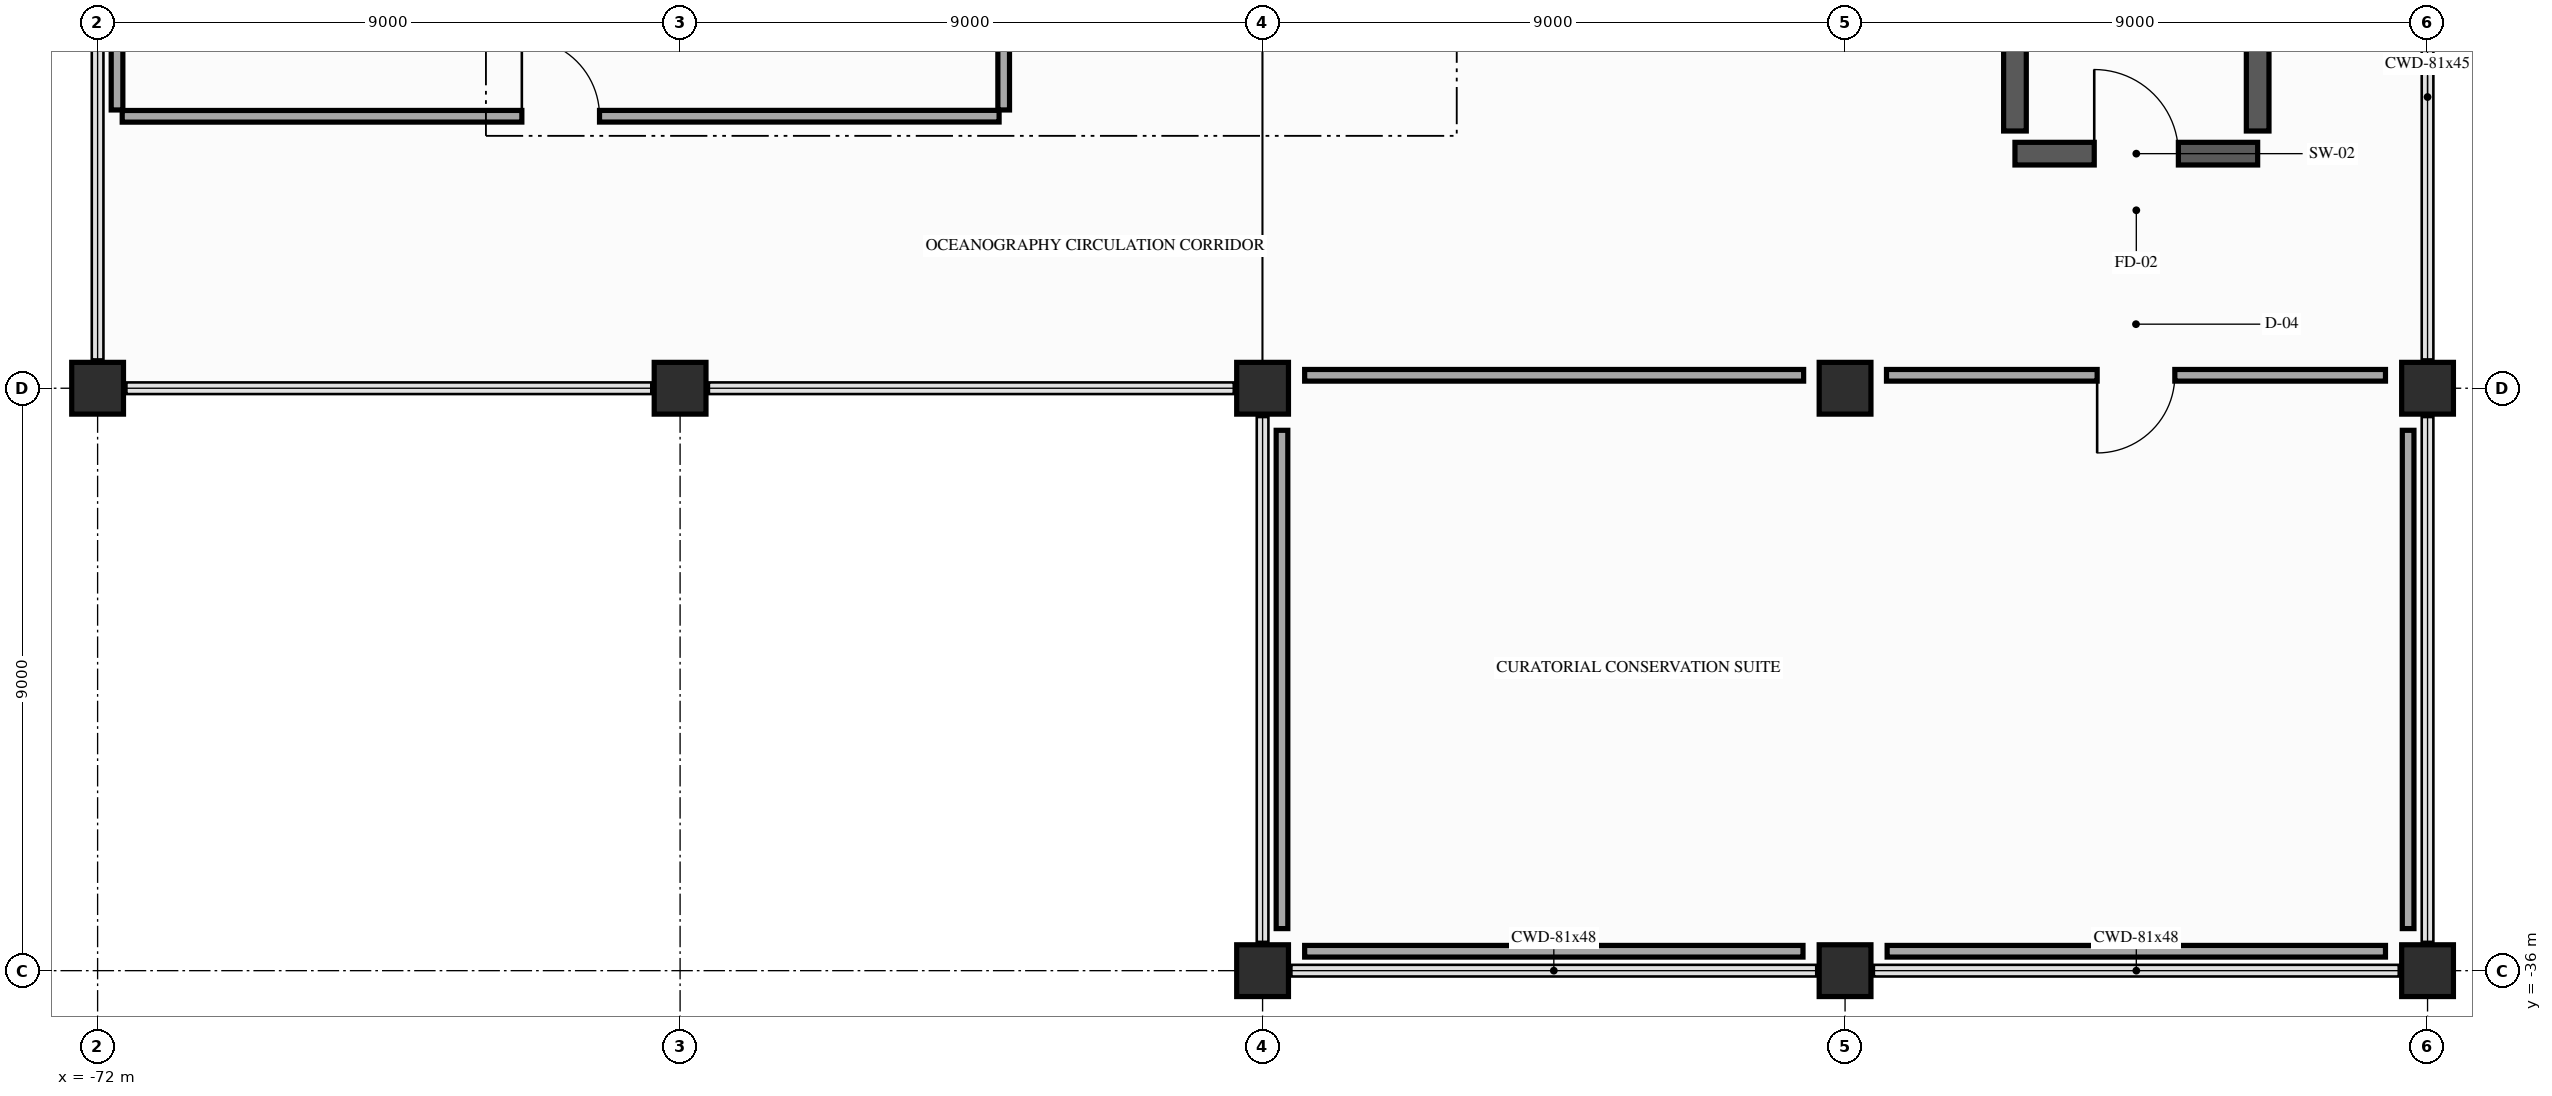
"""IFC4 building model, lengths in metres.
Left out: names, types, materials, properties, quantities, classifications, styles, units other than length and angle.
Written with IfcOpenShell. Run it as: python <this file> out.ifc"""

import sys

from ifc_helpers import new_model, si_unit, direction, frame, frame_2d, origin, origin_2d, place, context, subcontext, project, spatial, rectangle, extrude, element, fill, save


model = new_model("IFC4")
c1 = context("Model", 3, precision=1e-05, world=origin(), true_north=direction((0.0, 1.0)))
c2 = subcontext(c1, "Body", "Model", "MODEL_VIEW")
j1 = project(units=[si_unit("LENGTHUNIT", "METRE"), si_unit("PLANEANGLEUNIT", "RADIAN")], contexts=[c1])
p1 = place(None, origin())
s1 = spatial("IfcSite", under=j1, at=p1, CompositionType="ELEMENT")
p2 = place(p1, origin())
s2 = spatial("IfcBuilding", under=s1, at=p2, CompositionType="ELEMENT")
p3 = place(p2, frame((0.0, 0.0, 16.2)))
s3 = spatial("IfcBuildingStorey", under=s2, at=p3, CompositionType="ELEMENT", Elevation=16.2)
for number, where, z_axis, x_axis in (
    (1, (-72.0, -27.0, 0.0), (0.0, 0.0, 1.0), (1.0, 0.0, 0.0)),
    (2, (-63.0, -27.0, 0.0), (0.0, 0.0, 1.0), (1.0, 0.0, 0.0)),
    (3, (-54.0, -36.0, 0.0), (0.0, 0.0, 1.0), (1.0, 0.0, 0.0)),
    (4, (-54.0, -27.0, 0.0), (0.0, 0.0, 1.0), (1.0, 0.0, 0.0)),
    (5, (-45.0, -36.0, 0.0), (0.0, 0.0, 1.0), (1.0, 0.0, 0.0)),
    (6, (-45.0, -27.0, 0.0), (0.0, 0.0, 1.0), (1.0, 0.0, 0.0)),
    (7, (-36.0, -36.0, 0.0), (0.0, 0.0, 1.0), (1.0, 0.0, 0.0)),
    (8, (-36.0, -27.0, 0.0), (0.0, 0.0, 1.0), (1.0, 0.0, 0.0)),
):
    element("IfcColumn", number, at=place(p3, frame(where, z_axis=z_axis, x_axis=x_axis)), inside=s3, PredefinedType="COLUMN", context=c2, shape_type="SweptSolid", body=[
        extrude(rectangle(XDim=0.8, YDim=0.8, at=origin_2d()), origin(), (0.0, 0.0, 1.0), 5.4),
    ])
p4 = place(p3, frame((-42.375, -23.375, 0.0), z_axis=(0.0, 0.0, 1.0), x_axis=(1.0, 0.0, 0.0)))
e9 = element("IfcWall", 9, at=p4, inside=s3, PredefinedType="SHEAR", context=c2, shape_type="SweptSolid", body=[
    extrude(rectangle(XDim=3.75, YDim=0.35, at=frame_2d((1.875, 0.0))), origin(), (0.0, 0.0, 1.0), 5.15),
])
p5 = place(p4, frame((1.225, 0.0, 0.0)))
e10 = element("IfcOpeningElement", 10, at=p5, cuts=e9, PredefinedType="OPENING", context=c2, shape_type="SweptSolid", body=[
    extrude(rectangle(XDim=1.3, YDim=2.2, at=frame_2d((0.65, 1.1))), frame((0.0, 0.185, 0.0), z_axis=(0.0, -1.0, 0.0), x_axis=(1.0, 0.0, 0.0)), (0.0, 0.0, 1.0), 0.37),
])
for number, where, z_axis, x_axis in (
    (11, (-42.375, -23.025, 0.0), (0.0, 0.0, 1.0), (0.0, 1.0, 0.0)),
    (12, (-38.625, -23.025, 0.0), (0.0, 0.0, 1.0), (0.0, 1.0, 0.0)),
):
    element("IfcWall", number, at=place(p3, frame(where, z_axis=z_axis, x_axis=x_axis)), inside=s3, PredefinedType="SHEAR", context=c2, shape_type="SweptSolid", body=[
        extrude(rectangle(XDim=9.1, YDim=0.35, at=frame_2d((4.55, 0.0))), origin(), (0.0, 0.0, 1.0), 5.15),
    ])
p6 = place(p3, frame((-71.7, -18.65, 0.0), z_axis=(0.0, 0.0, 1.0), x_axis=(0.0, -1.0, 0.0)))
e13 = element("IfcWall", 13, at=p6, inside=s3, PredefinedType="PARTITIONING", context=c2, shape_type="SweptSolid", body=[
    extrude(rectangle(XDim=4.05, YDim=0.18, at=frame_2d((2.025, 0.0))), origin(), (0.0, 0.0, 1.0), 4.535),
])
p7 = place(p3, frame((-71.62, -22.798, 0.0), z_axis=(0.0, 0.0, 1.0), x_axis=(0.99999998685, 0.000162170926, 0.0)))
e14 = element("IfcWall", 14, at=p7, inside=s3, PredefinedType="PARTITIONING", context=c2, shape_type="SweptSolid", body=[
    extrude(rectangle(XDim=13.549, YDim=0.18, at=frame_2d((6.774, 0.0))), origin(), (0.0, 0.0, 1.0), 4.535),
])
p8 = place(p7, frame((6.175, 0.0, 0.0)))
e15 = element("IfcOpeningElement", 15, at=p8, cuts=e14, PredefinedType="OPENING", context=c2, shape_type="SweptSolid", body=[
    extrude(rectangle(XDim=1.2, YDim=2.2, at=frame_2d((0.6, 1.1))), frame((0.0, 0.1, 0.0), z_axis=(0.0, -1.0, 0.0), x_axis=(1.0, 0.0, 0.0)), (0.0, 0.0, 1.0), 0.2),
])
p9 = place(p3, frame((-58.0, -22.7, 0.0), z_axis=(0.0, 0.0, 1.0), x_axis=(-0.00026217473, 0.999999965632, 0.0)))
e16 = element("IfcWall", 16, at=p9, inside=s3, PredefinedType="PARTITIONING", context=c2, shape_type="SweptSolid", body=[
    extrude(rectangle(XDim=3.725, YDim=0.18, at=frame_2d((1.862, 0.0))), origin(), (0.0, 0.0, 1.0), 4.735),
])
for number, where, z_axis, x_axis in (
    (17, (-53.35, -35.7, 0.0), (0.0, 0.0, 1.0), (1.0, 0.0, 0.0)),
    (18, (-44.35, -35.7, 0.0), (0.0, 0.0, 1.0), (1.0, 0.0, 0.0)),
):
    element("IfcWall", number, at=place(p3, frame(where, z_axis=z_axis, x_axis=x_axis)), inside=s3, PredefinedType="PARTITIONING", context=c2, shape_type="SweptSolid", body=[
        extrude(rectangle(XDim=7.7, YDim=0.18, at=frame_2d((3.85, 0.0))), origin(), (0.0, 0.0, 1.0), 4.785),
    ])
p10 = place(p3, frame((-36.3, -35.35, 0.0), z_axis=(0.0, 0.0, 1.0), x_axis=(0.0, 1.0, 0.0)))
e19 = element("IfcWall", 19, at=p10, inside=s3, PredefinedType="PARTITIONING", context=c2, shape_type="SweptSolid", body=[
    extrude(rectangle(XDim=7.7, YDim=0.18, at=frame_2d((3.85, 0.0))), origin(), (0.0, 0.0, 1.0), 4.535),
])
p11 = place(p3, frame((-36.65, -26.8, 0.0), z_axis=(0.0, 0.0, 1.0), x_axis=(-1.0, 0.0, 0.0)))
e20 = element("IfcWall", 20, at=p11, inside=s3, PredefinedType="PARTITIONING", context=c2, shape_type="SweptSolid", body=[
    extrude(rectangle(XDim=7.71, YDim=0.18, at=frame_2d((3.855, 0.0))), origin(), (0.0, 0.0, 1.0), 4.535),
])
p12 = place(p11, frame((3.255, 0.0, 0.0)))
e21 = element("IfcOpeningElement", 21, at=p12, cuts=e20, PredefinedType="OPENING", context=c2, shape_type="SweptSolid", body=[
    extrude(rectangle(XDim=1.2, YDim=2.2, at=frame_2d((0.6, 1.1))), frame((0.0, 0.1, 0.0), z_axis=(0.0, -1.0, 0.0), x_axis=(1.0, 0.0, 0.0)), (0.0, 0.0, 1.0), 0.2),
])
p13 = place(p3, frame((-45.64, -26.8, 0.0), z_axis=(0.0, 0.0, 1.0), x_axis=(-1.0, 0.0, 0.0)))
e22 = element("IfcWall", 22, at=p13, inside=s3, PredefinedType="PARTITIONING", context=c2, shape_type="SweptSolid", body=[
    extrude(rectangle(XDim=7.71, YDim=0.18, at=frame_2d((3.855, 0.0))), origin(), (0.0, 0.0, 1.0), 4.535),
])
p14 = place(p3, frame((-53.7, -27.65, 0.0), z_axis=(0.0, 0.0, 1.0), x_axis=(0.0, -1.0, 0.0)))
e23 = element("IfcWall", 23, at=p14, inside=s3, PredefinedType="PARTITIONING", context=c2, shape_type="SweptSolid", body=[
    extrude(rectangle(XDim=7.7, YDim=0.18, at=frame_2d((3.85, 0.0))), origin(), (0.0, 0.0, 1.0), 4.535),
])
p15 = place(p5, origin())
e24 = element("IfcDoor", 24, at=p15, inside=s3, OperationType="SINGLE_SWING_LEFT", PredefinedType="DOOR", context=c2, shape_type="SweptSolid", body=[
    extrude(rectangle(XDim=1.3, YDim=2.2, at=frame_2d((0.65, 1.1))), frame((0.0, 0.025, 0.0), z_axis=(0.0, -1.0, 0.0), x_axis=(1.0, 0.0, 0.0)), (0.0, 0.0, 1.0), 0.05),
])
fill(e10, e24)
p16 = place(p8, origin())
e25 = element("IfcDoor", 25, at=p16, inside=s3, OperationType="SINGLE_SWING_LEFT", PredefinedType="DOOR", context=c2, shape_type="SweptSolid", body=[
    extrude(rectangle(XDim=1.2, YDim=2.2, at=frame_2d((0.6, 1.1))), frame((0.0, 0.025, 0.0), z_axis=(0.0, -1.0, 0.0), x_axis=(1.0, 0.0, 0.0)), (0.0, 0.0, 1.0), 0.05),
])
fill(e15, e25)
p17 = place(p12, origin())
e26 = element("IfcDoor", 26, at=p17, inside=s3, OperationType="SINGLE_SWING_RIGHT", PredefinedType="DOOR", context=c2, shape_type="SweptSolid", body=[
    extrude(rectangle(XDim=1.2, YDim=2.2, at=frame_2d((0.6, 1.1))), frame((0.0, 0.025, 0.0), z_axis=(0.0, -1.0, 0.0), x_axis=(1.0, 0.0, 0.0)), (0.0, 0.0, 1.0), 0.05),
])
fill(e21, e26)
save(model, sys.argv[1])
